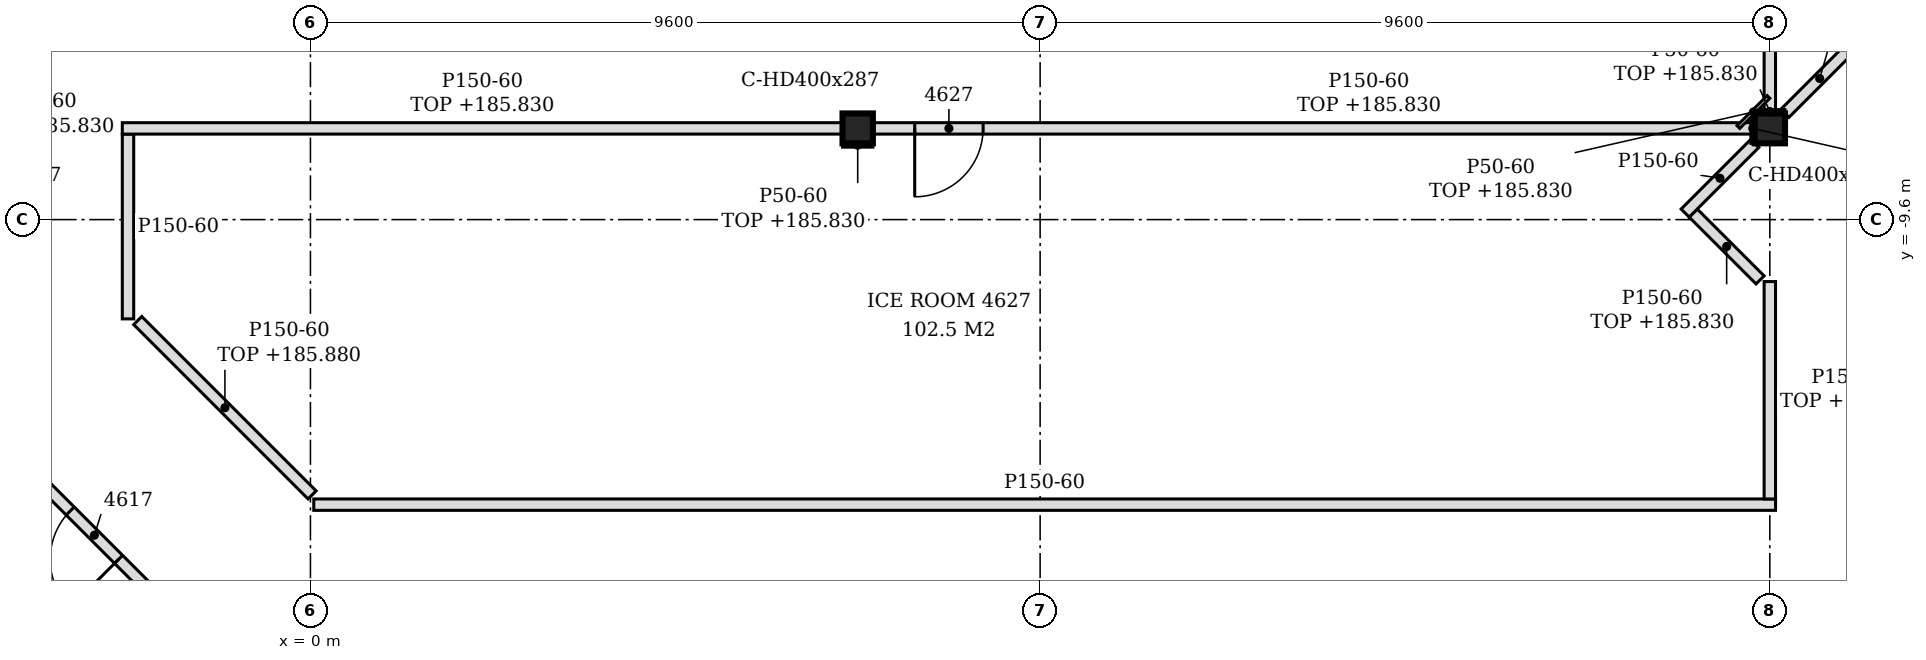
"""IFC4 building model, lengths in metres.
Left out: names, types, materials, properties, quantities, classifications, styles, units other than length and angle.
Written with IfcOpenShell. Run it as: python <this file> out.ifc"""

import sys

from ifc_helpers import new_model, si_unit, direction, frame, frame_2d, origin, origin_2d, place, context, subcontext, project, spatial, polyline, rectangle, i_section, outline, extrude, element, fill, save


model = new_model("IFC4")
c1 = context("Model", 3, precision=1e-05, world=origin(), true_north=direction((0.0, 1.0)))
c2 = subcontext(c1, "Body", "Model", "MODEL_VIEW")
j1 = project(units=[si_unit("LENGTHUNIT", "METRE"), si_unit("PLANEANGLEUNIT", "RADIAN")], contexts=[c1])
p1 = place(None, origin())
s1 = spatial("IfcSite", under=j1, at=p1, CompositionType="ELEMENT")
p2 = place(p1, origin())
s2 = spatial("IfcBuilding", under=s1, at=p2, CompositionType="ELEMENT")
p3 = place(p2, frame((0.0, 0.0, 183.0)))
s3 = spatial("IfcBuildingStorey", under=s2, at=p3, CompositionType="ELEMENT", Elevation=183.0)
for number, where, z_axis, x_axis in (
    (1, (7.2, -8.4, -0.15), (0.0, 0.0, 1.0), (1.0, 0.0, 0.0)),
    (2, (19.2, -8.4, -0.15), (0.0, 0.0, 1.0), (1.0, 0.0, 0.0)),
):
    element("IfcColumn", number, at=place(p3, frame(where, z_axis=z_axis, x_axis=x_axis)), inside=s3, PredefinedType="COLUMN", context=c2, shape_type="SweptSolid", body=[
        extrude(i_section(OverallWidth=0.399, OverallDepth=0.393, WebThickness=0.023, FlangeThickness=0.037, FilletRadius=0.015, at=origin_2d()), origin(), (0.0, 0.0, 1.0), 3.6),
    ])
p4 = place(p3, frame((-0.972, -15.622, 0.0), z_axis=(0.0, 0.0, 1.0), x_axis=(-0.707106781187, 0.707106781187, 0.0)))
e3 = element("IfcWall", 3, at=p4, inside=s3, PredefinedType="PARTITIONING", context=c2, shape_type="SweptSolid", body=[
    extrude(rectangle(XDim=18.809, YDim=0.15, at=frame_2d((9.405, 0.0))), origin(), (0.0, 0.0, 1.0), 2.83),
])
p5 = place(p4, frame((8.292, 0.0, 0.0)))
e4 = element("IfcOpeningElement", 4, at=p5, cuts=e3, PredefinedType="OPENING", context=c2, shape_type="SweptSolid", body=[
    extrude(rectangle(XDim=0.9, YDim=2.1, at=frame_2d((0.45, 1.05))), frame((0.0, 0.085, 0.0), z_axis=(0.0, -1.0, 0.0), x_axis=(1.0, 0.0, 0.0)), (0.0, 0.0, 1.0), 0.17),
])
p6 = place(p4, frame((2.195, 0.0, 0.0)))
e5 = element("IfcOpeningElement", 5, at=p6, cuts=e3, PredefinedType="OPENING", context=c2, shape_type="SweptSolid", body=[
    extrude(rectangle(XDim=0.9, YDim=2.1, at=frame_2d((0.45, 1.05))), frame((0.0, 0.085, 0.0), z_axis=(0.0, -1.0, 0.0), x_axis=(1.0, 0.0, 0.0)), (0.0, 0.0, 1.0), 0.17),
])
p7 = place(p3, frame((0.044, -13.35, 0.0), z_axis=(0.0, 0.0, 1.0), x_axis=(1.0, 0.0, 0.0)))
e6 = element("IfcWall", 6, at=p7, inside=s3, PredefinedType="PARTITIONING", context=c2, shape_type="SweptSolid", body=[
    extrude(outline(polyline([(0.0, 0.0), (19.231, 0.0), (19.231, 2.83), (19.006, 2.83), (19.004, 3.45), (7.306, 3.45), (7.304, 2.83), (7.006, 2.83), (7.004, 3.45), (0.0, 3.45), (0.0, 0.0)])), frame((0.0, 0.075, 0.0), z_axis=(0.0, -1.0, 0.0), x_axis=(1.0, 0.0, 0.0)), (0.0, 0.0, 1.0), 0.15),
])
p8 = place(p3, frame((19.2, -13.275, 0.0), z_axis=(0.0, 0.0, 1.0), x_axis=(0.0, 1.0, 0.0)))
e7 = element("IfcWall", 7, at=p8, inside=s3, PredefinedType="PARTITIONING", context=c2, shape_type="SweptSolid", body=[
    extrude(rectangle(XDim=2.86, YDim=0.15, at=frame_2d((1.43, 0.0))), origin(), (0.0, 0.0, 1.0), 2.83),
])
p9 = place(p3, frame((0.022, -13.222, 0.0), z_axis=(0.0, 0.0, 1.0), x_axis=(-0.707106781187, 0.707106781187, 0.0)))
e8 = element("IfcWall", 8, at=p9, inside=s3, PredefinedType="PARTITIONING", context=c2, shape_type="SweptSolid", body=[
    extrude(rectangle(XDim=3.244, YDim=0.15, at=frame_2d((1.622, 0.0))), origin(), (0.0, 0.0, 1.0), 2.88),
])
p10 = place(p3, frame((-2.4, -10.906, 0.0), z_axis=(0.0, 0.0, 1.0), x_axis=(0.0, 1.0, 0.0)))
e9 = element("IfcWall", 9, at=p10, inside=s3, PredefinedType="PARTITIONING", context=c2, shape_type="SweptSolid", body=[
    extrude(outline(polyline([(0.0, 0.0), (2.431, 0.0), (2.431, 2.83), (2.356, 2.83), (2.354, 3.45), (0.0, 3.45), (0.0, 0.0)])), frame((0.0, 0.075, 0.0), z_axis=(0.0, -1.0, 0.0), x_axis=(1.0, 0.0, 0.0)), (0.0, 0.0, 1.0), 0.15),
])
p11 = place(p3, frame((19.072, -10.393, 0.0), z_axis=(0.0, 0.0, 1.0), x_axis=(-0.70740114323, 0.706812296552, 0.0)))
e10 = element("IfcWall", 10, at=p11, inside=s3, PredefinedType="PARTITIONING", context=c2, shape_type="SweptSolid", body=[
    extrude(rectangle(XDim=1.244, YDim=0.15, at=frame_2d((0.622, 0.0))), origin(), (0.0, 0.0, 1.0), 2.83),
])
p12 = place(p3, frame((18.086, -9.514, 0.0), z_axis=(0.0, 0.0, 1.0), x_axis=(0.707106781187, 0.707106781187, 0.0)))
e11 = element("IfcWall", 11, at=p12, inside=s3, PredefinedType="PARTITIONING", context=c2, shape_type="SweptSolid", body=[
    extrude(rectangle(XDim=1.295, YDim=0.15, at=frame_2d((0.648, 0.0))), origin(), (0.0, 0.0, 1.0), 3.45),
])
p13 = place(p3, frame((-2.475, -8.4, 0.0), z_axis=(0.0, 0.0, 1.0), x_axis=(1.0, 0.0, 0.0)))
e12 = element("IfcWall", 12, at=p13, inside=s3, PredefinedType="PARTITIONING", context=c2, shape_type="SweptSolid", body=[
    extrude(rectangle(XDim=9.476, YDim=0.15, at=frame_2d((4.738, 0.0))), origin(), (0.0, 0.0, 1.0), 2.83),
])
p14 = place(p3, frame((7.399, -8.4, 0.0), z_axis=(0.0, 0.0, 1.0), x_axis=(1.0, 0.0, 0.0)))
e13 = element("IfcWall", 13, at=p14, inside=s3, PredefinedType="PARTITIONING", context=c2, shape_type="SweptSolid", body=[
    extrude(rectangle(XDim=11.601, YDim=0.15, at=frame_2d((5.801, 0.0))), origin(), (0.0, 0.0, 1.0), 2.83),
])
p15 = place(p14, frame((0.551, 0.0, 0.0)))
e14 = element("IfcOpeningElement", 14, at=p15, cuts=e13, PredefinedType="OPENING", context=c2, shape_type="SweptSolid", body=[
    extrude(rectangle(XDim=0.9, YDim=2.1, at=frame_2d((0.45, 1.05))), frame((0.0, 0.085, 0.0), z_axis=(0.0, -1.0, 0.0), x_axis=(1.0, 0.0, 0.0)), (0.0, 0.0, 1.0), 0.17),
])
p16 = place(p3, frame((19.2, -8.204, 0.0), z_axis=(0.0, 0.0, 1.0), x_axis=(0.0, 1.0, 0.0)))
e15 = element("IfcWall", 15, at=p16, inside=s3, PredefinedType="PARTITIONING", context=c2, shape_type="SweptSolid", body=[
    extrude(rectangle(XDim=9.329, YDim=0.15, at=frame_2d((4.664, 0.0))), origin(), (0.0, 0.0, 1.0), 2.83),
])
p17 = place(p3, frame((19.398, -8.202, 0.0), z_axis=(0.0, 0.0, 1.0), x_axis=(0.707200993001, 0.707012556818, 0.0)))
e16 = element("IfcWall", 16, at=p17, inside=s3, PredefinedType="PARTITIONING", context=c2, shape_type="SweptSolid", body=[
    extrude(rectangle(XDim=1.296, YDim=0.15, at=frame_2d((0.648, 0.0))), origin(), (0.0, 0.0, 1.0), 2.88),
])
p18 = place(p3, frame((18.786, -8.382, 0.0), z_axis=(0.0, 0.0, 1.0), x_axis=(0.707106781187, 0.707106781187, 0.0)))
e17 = element("IfcWall", 17, at=p18, inside=s3, PredefinedType="PARTITIONING", context=c2, shape_type="SweptSolid", body=[
    extrude(rectangle(XDim=0.56, YDim=0.05, at=frame_2d((0.28, 0.0))), origin(), (0.0, 0.0, 1.0), 2.83),
])
for number, where, z_axis, x_axis in (
    (18, (7.0, -8.622, 0.0), (0.0, 0.0, 1.0), (1.0, 0.0, 0.0)),
    (19, (19.0, -8.178, 0.0), (0.0, 0.0, 1.0), (1.0, 0.0, 0.0)),
):
    element("IfcWall", number, at=place(p3, frame(where, z_axis=z_axis, x_axis=x_axis)), inside=s3, PredefinedType="PARTITIONING", context=c2, shape_type="SweptSolid", body=[
        extrude(rectangle(XDim=0.399, YDim=0.05, at=frame_2d((0.199, 0.0))), origin(), (0.0, 0.0, 1.0), 2.83),
    ])
p19 = place(p3, frame((18.976, -8.596, 0.0), z_axis=(0.0, 0.0, 1.0), x_axis=(0.0, 1.0, 0.0)))
e20 = element("IfcWall", 20, at=p19, inside=s3, PredefinedType="PARTITIONING", context=c2, shape_type="SweptSolid", body=[
    extrude(rectangle(XDim=0.393, YDim=0.05, at=frame_2d((0.196, 0.0))), origin(), (0.0, 0.0, 1.0), 2.83),
])
p20 = place(p6, origin())
e21 = element("IfcDoor", 21, at=p20, inside=s3, OperationType="SINGLE_SWING_LEFT", PredefinedType="DOOR", context=c2, shape_type="SweptSolid", body=[
    extrude(rectangle(XDim=0.9, YDim=2.1, at=frame_2d((0.45, 1.05))), frame((0.0, 0.025, 0.0), z_axis=(0.0, -1.0, 0.0), x_axis=(1.0, 0.0, 0.0)), (0.0, 0.0, 1.0), 0.05),
])
fill(e5, e21)
p21 = place(p15, frame((0.9, 0.0, 0.0), z_axis=(0.0, 0.0, 1.0), x_axis=(-1.0, 0.0, 0.0)))
e22 = element("IfcDoor", 22, at=p21, inside=s3, OperationType="SINGLE_SWING_RIGHT", PredefinedType="DOOR", context=c2, shape_type="SweptSolid", body=[
    extrude(rectangle(XDim=0.9, YDim=2.1, at=frame_2d((0.45, 1.05))), frame((0.0, 0.025, 0.0), z_axis=(0.0, -1.0, 0.0), x_axis=(1.0, 0.0, 0.0)), (0.0, 0.0, 1.0), 0.05),
])
fill(e14, e22)
save(model, sys.argv[1])
